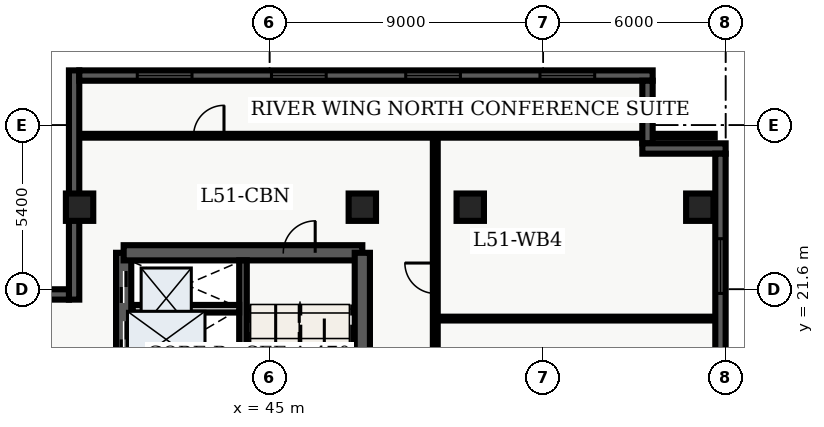
"""IFC4 building model, lengths in metres.
Left out: names, types, materials, properties, quantities, classifications, styles, units other than length and angle.
Written with IfcOpenShell. Run it as: python <this file> out.ifc"""

import sys

from ifc_helpers import new_model, entity, si_unit, converted_unit, direction, frame, origin_with_axes, origin_2d_with_axis, place, context, subcontext, project, spatial, polyline, rectangle, outline, extrude, element, fill, save


model = new_model("IFC4")
c1 = context("Model", 3, precision=1e-05, world=origin_with_axes(), true_north=direction((0.0, 1.0)))
c2 = subcontext(c1, "Body", "Model", "MODEL_VIEW")
j1 = project(units=[si_unit("LENGTHUNIT", "METRE"), converted_unit("PLANEANGLEUNIT", "DEGREE", entity("IfcPlaneAngleMeasure", 0.017), si_unit("PLANEANGLEUNIT", "RADIAN"), dimensions=[0, 0, 0, 0, 0, 0, 0])], contexts=[c1])
p1 = place(None, origin_with_axes())
s1 = spatial("IfcSite", under=j1, at=p1, CompositionType="ELEMENT")
p2 = place(p1, origin_with_axes())
s2 = spatial("IfcBuilding", under=s1, at=p2, CompositionType="ELEMENT")
p3 = place(p2, frame((0.0, 0.0, 208.2), z_axis=(0.0, 0.0, 1.0), x_axis=(1.0, 0.0, 0.0)))
s3 = spatial("IfcBuildingStorey", under=s2, at=p3, CompositionType="ELEMENT", Elevation=208.2)
p4 = place(p3, frame((40.2, 7.2, 0.0), z_axis=(0.0, 0.0, 1.0), x_axis=(0.0, 1.0, 0.0)))
e1 = element("IfcWall", 1, at=p4, inside=s3, PredefinedType="SHEAR", context=c2, shape_type="SweptSolid", body=[
    extrude(outline(polyline([(0.0, -0.25), (15.6, -0.25), (15.6, 0.25), (0.0, 0.25), (0.0, -0.25)])), origin_with_axes(), (0.0, 0.0, 1.0), 3.66),
])
p5 = place(p4, frame((14.475, 0.0, 0.0), z_axis=(0.0, 0.0, 1.0), x_axis=(1.0, 0.0, 0.0)))
e2 = element("IfcOpeningElement", 2, at=p5, cuts=e1, PredefinedType="OPENING", context=c2, shape_type="SweptSolid", body=[
    extrude(rectangle(XDim=1.05, YDim=0.52, at=origin_2d_with_axis()), origin_with_axes(), (0.0, 0.0, 1.0), 2.15),
])
p6 = place(p4, frame((12.75, 0.0, 0.0), z_axis=(0.0, 0.0, 1.0), x_axis=(1.0, 0.0, 0.0)))
e3 = element("IfcOpeningElement", 3, at=p6, cuts=e1, PredefinedType="OPENING", context=c2, shape_type="SweptSolid", body=[
    extrude(rectangle(XDim=1.2, YDim=0.52, at=origin_2d_with_axis()), origin_with_axes(), (0.0, 0.0, 1.0), 2.15),
])
p7 = place(p4, frame((9.3, 0.0, 0.0), z_axis=(0.0, 0.0, 1.0), x_axis=(1.0, 0.0, 0.0)))
e4 = element("IfcOpeningElement", 4, at=p7, cuts=e1, PredefinedType="OPENING", context=c2, shape_type="SweptSolid", body=[
    extrude(rectangle(XDim=0.9, YDim=0.52, at=origin_2d_with_axis()), origin_with_axes(), (0.0, 0.0, 1.0), 2.15),
])
p8 = place(p3, frame((40.2, 22.8, 0.0), z_axis=(0.0, 0.0, 1.0), x_axis=(1.0, 0.0, 0.0)))
e5 = element("IfcWall", 5, at=p8, inside=s3, PredefinedType="SHEAR", context=c2, shape_type="SweptSolid", body=[
    extrude(outline(polyline([(0.0, -0.25), (7.85, -0.25), (7.85, 0.25), (0.0, 0.25), (0.0, -0.25)])), origin_with_axes(), (0.0, 0.0, 1.0), 3.66),
])
p9 = place(p8, frame((5.775, 0.0, 0.0), z_axis=(0.0, 0.0, 1.0), x_axis=(1.0, 0.0, 0.0)))
e6 = element("IfcOpeningElement", 6, at=p9, cuts=e5, PredefinedType="OPENING", context=c2, shape_type="SweptSolid", body=[
    extrude(rectangle(XDim=1.05, YDim=0.52, at=origin_2d_with_axis()), origin_with_axes(), (0.0, 0.0, 1.0), 2.15),
])
p10 = place(p3, frame((48.05, 7.2, 0.0), z_axis=(0.0, 0.0, 1.0), x_axis=(0.0, 1.0, 0.0)))
e7 = element("IfcWall", 7, at=p10, inside=s3, PredefinedType="SHEAR", context=c2, shape_type="SweptSolid", body=[
    extrude(outline(polyline([(0.0, -0.25), (15.6, -0.25), (15.6, 0.25), (0.0, 0.25), (0.0, -0.25)])), origin_with_axes(), (0.0, 0.0, 1.0), 3.66),
])
p11 = place(p10, frame((5.975, 0.0, 0.0), z_axis=(0.0, 0.0, 1.0), x_axis=(1.0, 0.0, 0.0)))
e8 = element("IfcOpeningElement", 8, at=p11, cuts=e7, PredefinedType="OPENING", context=c2, shape_type="SweptSolid", body=[
    extrude(rectangle(XDim=1.05, YDim=0.52, at=origin_2d_with_axis()), origin_with_axes(), (0.0, 0.0, 1.0), 2.15),
])
p12 = place(p10, frame((2.725, 0.0, 0.0), z_axis=(0.0, 0.0, 1.0), x_axis=(1.0, 0.0, 0.0)))
e9 = element("IfcOpeningElement", 9, at=p12, cuts=e7, PredefinedType="OPENING", context=c2, shape_type="SweptSolid", body=[
    extrude(rectangle(XDim=0.95, YDim=0.52, at=origin_2d_with_axis()), origin_with_axes(), (0.0, 0.0, 1.0), 2.15),
])
p13 = place(p3, frame((44.125, 7.45, 0.0), z_axis=(0.0, 0.0, 1.0), x_axis=(0.0, 1.0, 0.0)))
e10 = element("IfcWall", 10, at=p13, inside=s3, PredefinedType="SHEAR", context=c2, shape_type="SweptSolid", body=[
    extrude(outline(polyline([(0.0, -0.125), (15.1, -0.125), (15.1, 0.125), (0.0, 0.125), (0.0, -0.125)])), origin_with_axes(), (0.0, 0.0, 1.0), 3.66),
])
for number, where, z_axis, x_axis in (
    (11, (38.75, 24.3, 0.0), (0.0, 0.0, 1.0), (1.0, 0.0, 0.0)),
    (12, (48.05, 24.3, 0.0), (0.0, 0.0, 1.0), (1.0, 0.0, 0.0)),
    (13, (51.6, 24.3, 0.0), (0.0, 0.0, 1.0), (1.0, 0.0, 0.0)),
    (14, (59.15, 24.3, 0.0), (0.0, 0.0, 1.0), (1.0, 0.0, 0.0)),
):
    element("IfcColumn", number, at=place(p3, frame(where, z_axis=z_axis, x_axis=x_axis)), inside=s3, PredefinedType="COLUMN", context=c2, shape_type="SweptSolid", body=[
        extrude(rectangle(XDim=0.9, YDim=0.9, at=origin_2d_with_axis()), origin_with_axes(), (0.0, 0.0, 1.0), 3.9),
    ])
p14 = place(p3, frame((40.5, 20.96, 0.0), z_axis=(0.0, 0.0, 1.0), x_axis=(1.0, 0.0, 0.0)))
e15 = element("IfcWall", 15, at=p14, inside=s3, PredefinedType="SOLIDWALL", context=c2, shape_type="SweptSolid", body=[
    extrude(outline(polyline([(0.0, -0.125), (3.5, -0.125), (3.5, 0.125), (0.0, 0.125), (0.0, -0.125)])), origin_with_axes(), (0.0, 0.0, 1.0), 2.7),
])
p15 = place(p3, frame((50.45, 7.85, 0.0), z_axis=(0.0, 0.0, 1.0), x_axis=(0.0, 1.0, 0.0)))
e16 = element("IfcWall", 16, at=p15, inside=s3, PredefinedType="PARTITIONING", context=c2, shape_type="SweptSolid", body=[
    extrude(outline(polyline([(0.0, -0.08), (18.8, -0.08), (18.8, 0.08), (0.0, 0.08), (0.0, -0.08)])), origin_with_axes(), (0.0, 0.0, 1.0), 2.7),
])
p16 = place(p15, frame((5.852, 0.0, 0.0), z_axis=(0.0, 0.0, 1.0), x_axis=(1.0, 0.0, 0.0)))
e17 = element("IfcOpeningElement", 17, at=p16, cuts=e16, PredefinedType="OPENING", context=c2, shape_type="SweptSolid", body=[
    extrude(rectangle(XDim=1.0, YDim=0.18, at=origin_2d_with_axis()), origin_with_axes(), (0.0, 0.0, 1.0), 2.15),
])
p17 = place(p15, frame((11.249, 0.0, 0.0), z_axis=(0.0, 0.0, 1.0), x_axis=(1.0, 0.0, 0.0)))
e18 = element("IfcOpeningElement", 18, at=p17, cuts=e16, PredefinedType="OPENING", context=c2, shape_type="SweptSolid", body=[
    extrude(rectangle(XDim=1.0, YDim=0.18, at=origin_2d_with_axis()), origin_with_axes(), (0.0, 0.0, 1.0), 2.15),
])
p18 = place(p15, frame((14.113, 0.0, 0.0), z_axis=(0.0, 0.0, 1.0), x_axis=(1.0, 0.0, 0.0)))
e19 = element("IfcOpeningElement", 19, at=p18, cuts=e16, PredefinedType="OPENING", context=c2, shape_type="SweptSolid", body=[
    extrude(rectangle(XDim=1.0, YDim=0.18, at=origin_2d_with_axis()), origin_with_axes(), (0.0, 0.0, 1.0), 2.15),
])
p19 = place(p3, frame((38.735, 26.65, 0.0), z_axis=(0.0, 0.0, 1.0), x_axis=(1.0, 0.0, 0.0)))
e20 = element("IfcWall", 20, at=p19, inside=s3, PredefinedType="PARTITIONING", context=c2, shape_type="SweptSolid", body=[
    extrude(outline(polyline([(0.0, -0.062), (20.905, -0.062), (20.905, 0.062), (0.0, 0.062), (0.0, -0.062)])), origin_with_axes(), (0.0, 0.0, 1.0), 2.7),
])
p20 = place(p19, frame((4.265, 0.0, 0.0), z_axis=(0.0, 0.0, 1.0), x_axis=(1.0, 0.0, 0.0)))
e21 = element("IfcOpeningElement", 21, at=p20, cuts=e20, PredefinedType="OPENING", context=c2, shape_type="SweptSolid", body=[
    extrude(rectangle(XDim=1.0, YDim=0.145, at=origin_2d_with_axis()), origin_with_axes(), (0.0, 0.0, 1.0), 2.15),
])
p21 = place(p3, frame((50.57, 20.636, 0.0), z_axis=(0.0, 0.0, 1.0), x_axis=(1.0, 0.0, 0.0)))
e22 = element("IfcWall", 22, at=p21, inside=s3, PredefinedType="PARTITIONING", context=c2, shape_type="SweptSolid", body=[
    extrude(outline(polyline([(0.0, -0.062), (9.095, -0.062), (9.095, 0.062), (0.0, 0.062), (0.0, -0.062)])), origin_with_axes(), (0.0, 0.0, 1.0), 2.7),
])
p22 = place(p3, frame((38.57, 21.26, 0.0), z_axis=(0.0, 0.0, 1.0), x_axis=(0.0, 1.0, 0.0)))
e23 = element("IfcWall", 23, at=p22, inside=s3, PredefinedType="SOLIDWALL", context=c2, shape_type="SweptSolid", body=[
    extrude(outline(polyline([(0.0, -0.17), (7.54, -0.17), (7.54, 0.17), (0.0, 0.17), (0.0, -0.17)])), origin_with_axes(), (0.0, 0.0, 1.0), 3.66),
])
p23 = place(p3, frame((38.74, 28.63, 0.0), z_axis=(0.0, 0.0, 1.0), x_axis=(1.0, 0.0, 0.0)))
e24 = element("IfcWall", 24, at=p23, inside=s3, PredefinedType="SOLIDWALL", context=c2, shape_type="SweptSolid", body=[
    extrude(outline(polyline([(0.0, -0.17), (18.86, -0.17), (18.86, 0.17), (0.0, 0.17), (0.0, -0.17)])), origin_with_axes(), (0.0, 0.0, 1.0), 3.66),
])
p24 = place(p23, frame((2.808, 0.0, 0.45), z_axis=(0.0, 0.0, 1.0), x_axis=(1.0, 0.0, 0.0)))
e25 = element("IfcOpeningElement", 25, at=p24, cuts=e24, PredefinedType="OPENING", context=c2, shape_type="SweptSolid", body=[
    extrude(rectangle(XDim=1.8, YDim=0.36, at=origin_2d_with_axis()), origin_with_axes(), (0.0, 0.0, 1.0), 2.1),
])
p25 = place(p23, frame((7.222, 0.0, 0.45), z_axis=(0.0, 0.0, 1.0), x_axis=(1.0, 0.0, 0.0)))
e26 = element("IfcOpeningElement", 26, at=p25, cuts=e24, PredefinedType="OPENING", context=c2, shape_type="SweptSolid", body=[
    extrude(rectangle(XDim=1.8, YDim=0.36, at=origin_2d_with_axis()), origin_with_axes(), (0.0, 0.0, 1.0), 2.1),
])
p26 = place(p23, frame((11.637, 0.0, 0.45), z_axis=(0.0, 0.0, 1.0), x_axis=(1.0, 0.0, 0.0)))
e27 = element("IfcOpeningElement", 27, at=p26, cuts=e24, PredefinedType="OPENING", context=c2, shape_type="SweptSolid", body=[
    extrude(rectangle(XDim=1.8, YDim=0.36, at=origin_2d_with_axis()), origin_with_axes(), (0.0, 0.0, 1.0), 2.1),
])
p27 = place(p23, frame((16.053, 0.0, 0.45), z_axis=(0.0, 0.0, 1.0), x_axis=(1.0, 0.0, 0.0)))
e28 = element("IfcOpeningElement", 28, at=p27, cuts=e24, PredefinedType="OPENING", context=c2, shape_type="SweptSolid", body=[
    extrude(rectangle(XDim=1.8, YDim=0.36, at=origin_2d_with_axis()), origin_with_axes(), (0.0, 0.0, 1.0), 2.1),
])
p28 = place(p3, frame((57.43, 28.46, 0.0), z_axis=(0.0, 0.0, 1.0), x_axis=(0.0, -1.0, 0.0)))
e29 = element("IfcWall", 29, at=p28, inside=s3, PredefinedType="SOLIDWALL", context=c2, shape_type="SweptSolid", body=[
    extrude(outline(polyline([(0.0, -0.17), (2.06, -0.17), (2.06, 0.17), (0.0, 0.17), (0.0, -0.17)])), origin_with_axes(), (0.0, 0.0, 1.0), 3.66),
])
p29 = place(p3, frame((57.26, 26.23, 0.0), z_axis=(0.0, 0.0, 1.0), x_axis=(1.0, 0.0, 0.0)))
e30 = element("IfcWall", 30, at=p29, inside=s3, PredefinedType="SOLIDWALL", context=c2, shape_type="SweptSolid", body=[
    extrude(outline(polyline([(0.0, -0.17), (2.74, -0.17), (2.74, 0.17), (0.0, 0.17), (0.0, -0.17)])), origin_with_axes(), (0.0, 0.0, 1.0), 3.66),
])
p30 = place(p3, frame((59.83, 26.06, 0.0), z_axis=(0.0, 0.0, 1.0), x_axis=(0.0, -1.0, 0.0)))
e31 = element("IfcWall", 31, at=p30, inside=s3, PredefinedType="SOLIDWALL", context=c2, shape_type="SweptSolid", body=[
    extrude(outline(polyline([(0.0, -0.17), (23.66, -0.17), (23.66, 0.17), (0.0, 0.17), (0.0, -0.17)])), origin_with_axes(), (0.0, 0.0, 1.0), 3.66),
])
p31 = place(p30, frame((3.696, 0.0, 0.45), z_axis=(0.0, 0.0, 1.0), x_axis=(1.0, 0.0, 0.0)))
e32 = element("IfcOpeningElement", 32, at=p31, cuts=e31, PredefinedType="OPENING", context=c2, shape_type="SweptSolid", body=[
    extrude(rectangle(XDim=1.8, YDim=0.36, at=origin_2d_with_axis()), origin_with_axes(), (0.0, 0.0, 1.0), 2.1),
])
p32 = place(p30, frame((11.83, 0.0, 0.45), z_axis=(0.0, 0.0, 1.0), x_axis=(1.0, 0.0, 0.0)))
e33 = element("IfcOpeningElement", 33, at=p32, cuts=e31, PredefinedType="OPENING", context=c2, shape_type="SweptSolid", body=[
    extrude(rectangle(XDim=1.8, YDim=0.36, at=origin_2d_with_axis()), origin_with_axes(), (0.0, 0.0, 1.0), 2.1),
])
p33 = place(p30, frame((20.364, 0.0, 0.45), z_axis=(0.0, 0.0, 1.0), x_axis=(1.0, 0.0, 0.0)))
e34 = element("IfcOpeningElement", 34, at=p33, cuts=e31, PredefinedType="OPENING", context=c2, shape_type="SweptSolid", body=[
    extrude(rectangle(XDim=1.8, YDim=0.36, at=origin_2d_with_axis()), origin_with_axes(), (0.0, 0.0, 1.0), 2.1),
])
p34 = place(p3, frame((30.346, 21.43, 0.0), z_axis=(0.0, 0.0, 1.0), x_axis=(1.0, 0.0, 0.0)))
e35 = element("IfcWall", 35, at=p34, inside=s3, PredefinedType="SOLIDWALL", context=c2, shape_type="SweptSolid", body=[
    extrude(outline(polyline([(0.0, -0.17), (8.054, -0.17), (8.054, 0.17), (0.0, 0.17), (0.0, -0.17)])), origin_with_axes(), (0.0, 0.0, 1.0), 3.66),
])
p35 = place(p34, frame((4.027, 0.0, 0.45), z_axis=(0.0, 0.0, 1.0), x_axis=(1.0, 0.0, 0.0)))
e36 = element("IfcOpeningElement", 36, at=p35, cuts=e35, PredefinedType="OPENING", context=c2, shape_type="SweptSolid", body=[
    extrude(rectangle(XDim=1.8, YDim=0.36, at=origin_2d_with_axis()), origin_with_axes(), (0.0, 0.0, 1.0), 2.1),
])
p36 = place(p4, frame((14.475, 0.0, 0.0), z_axis=(0.0, 0.0, 1.0), x_axis=(1.0, 0.0, 0.0)))
e37 = element("IfcDoor", 37, at=p36, inside=s3, OperationType="SLIDING_TO_RIGHT", PredefinedType="DOOR", context=c2, shape_type="SweptSolid", body=[
    extrude(rectangle(XDim=1.05, YDim=0.09, at=origin_2d_with_axis()), origin_with_axes(), (0.0, 0.0, 1.0), 2.15),
])
fill(e2, e37)
p37 = place(p4, frame((12.75, 0.0, 0.0), z_axis=(0.0, 0.0, 1.0), x_axis=(1.0, 0.0, 0.0)))
e38 = element("IfcDoor", 38, at=p37, inside=s3, OperationType="DOUBLE_DOOR_SLIDING", PredefinedType="DOOR", context=c2, shape_type="SweptSolid", body=[
    extrude(rectangle(XDim=1.2, YDim=0.09, at=origin_2d_with_axis()), origin_with_axes(), (0.0, 0.0, 1.0), 2.15),
])
fill(e3, e38)
p38 = place(p8, frame((5.775, 0.0, 0.0), z_axis=(0.0, 0.0, 1.0), x_axis=(1.0, 0.0, 0.0)))
e39 = element("IfcDoor", 39, at=p38, inside=s3, OperationType="SINGLE_SWING_RIGHT", PredefinedType="DOOR", context=c2, shape_type="SweptSolid", body=[
    extrude(rectangle(XDim=1.05, YDim=0.09, at=origin_2d_with_axis()), origin_with_axes(), (0.0, 0.0, 1.0), 2.15),
])
fill(e6, e39)
p39 = place(p19, frame((4.265, 0.0, 0.0), z_axis=(0.0, 0.0, 1.0), x_axis=(1.0, 0.0, 0.0)))
e40 = element("IfcDoor", 40, at=p39, inside=s3, OperationType="SINGLE_SWING_RIGHT", PredefinedType="DOOR", context=c2, shape_type="SweptSolid", body=[
    extrude(rectangle(XDim=1.0, YDim=0.075, at=origin_2d_with_axis()), origin_with_axes(), (0.0, 0.0, 1.0), 2.15),
])
fill(e21, e40)
p40 = place(p15, frame((14.113, 0.0, 0.0), z_axis=(0.0, 0.0, 1.0), x_axis=(1.0, 0.0, 0.0)))
e41 = element("IfcDoor", 41, at=p40, inside=s3, OperationType="SINGLE_SWING_RIGHT", PredefinedType="DOOR", context=c2, shape_type="SweptSolid", body=[
    extrude(rectangle(XDim=1.0, YDim=0.09, at=origin_2d_with_axis()), origin_with_axes(), (0.0, 0.0, 1.0), 2.15),
])
fill(e19, e41)
p41 = place(p23, frame((2.808, 0.0, 0.45), z_axis=(0.0, 0.0, 1.0), x_axis=(1.0, 0.0, 0.0)))
e42 = element("IfcWindow", 42, at=p41, inside=s3, PredefinedType="WINDOW", context=c2, shape_type="SweptSolid", body=[
    extrude(rectangle(XDim=1.8, YDim=0.09, at=origin_2d_with_axis()), origin_with_axes(), (0.0, 0.0, 1.0), 2.1),
])
fill(e25, e42)
p42 = place(p23, frame((7.222, 0.0, 0.45), z_axis=(0.0, 0.0, 1.0), x_axis=(1.0, 0.0, 0.0)))
e43 = element("IfcWindow", 43, at=p42, inside=s3, PredefinedType="WINDOW", context=c2, shape_type="SweptSolid", body=[
    extrude(rectangle(XDim=1.8, YDim=0.09, at=origin_2d_with_axis()), origin_with_axes(), (0.0, 0.0, 1.0), 2.1),
])
fill(e26, e43)
p43 = place(p23, frame((11.637, 0.0, 0.45), z_axis=(0.0, 0.0, 1.0), x_axis=(1.0, 0.0, 0.0)))
e44 = element("IfcWindow", 44, at=p43, inside=s3, PredefinedType="WINDOW", context=c2, shape_type="SweptSolid", body=[
    extrude(rectangle(XDim=1.8, YDim=0.09, at=origin_2d_with_axis()), origin_with_axes(), (0.0, 0.0, 1.0), 2.1),
])
fill(e27, e44)
p44 = place(p23, frame((16.053, 0.0, 0.45), z_axis=(0.0, 0.0, 1.0), x_axis=(1.0, 0.0, 0.0)))
e45 = element("IfcWindow", 45, at=p44, inside=s3, PredefinedType="WINDOW", context=c2, shape_type="SweptSolid", body=[
    extrude(rectangle(XDim=1.8, YDim=0.09, at=origin_2d_with_axis()), origin_with_axes(), (0.0, 0.0, 1.0), 2.1),
])
fill(e28, e45)
p45 = place(p30, frame((3.696, 0.0, 0.45), z_axis=(0.0, 0.0, 1.0), x_axis=(1.0, 0.0, 0.0)))
e46 = element("IfcWindow", 46, at=p45, inside=s3, PredefinedType="WINDOW", context=c2, shape_type="SweptSolid", body=[
    extrude(rectangle(XDim=1.8, YDim=0.09, at=origin_2d_with_axis()), origin_with_axes(), (0.0, 0.0, 1.0), 2.1),
])
fill(e32, e46)
save(model, sys.argv[1])
